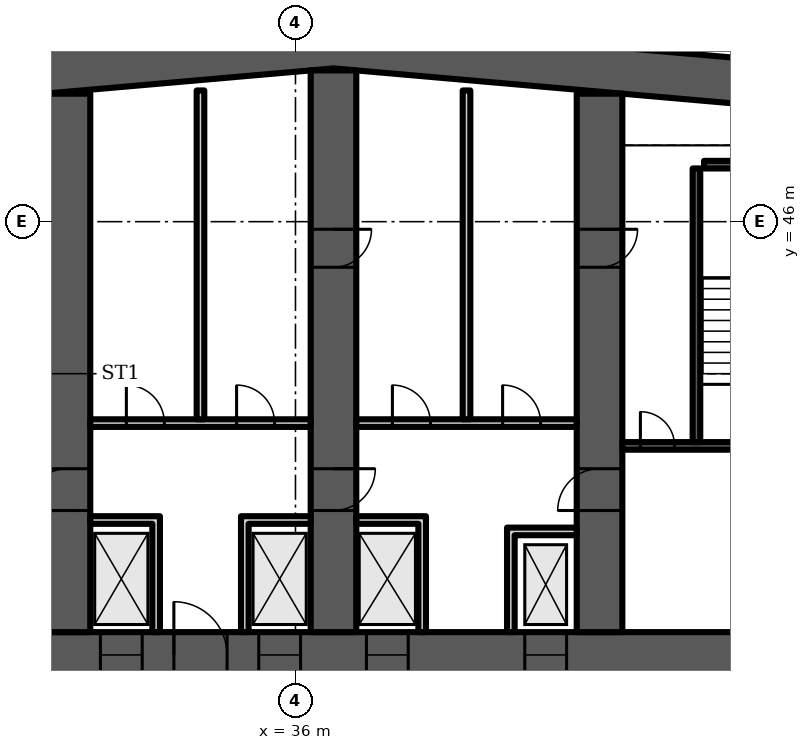
"""IFC4 building model, lengths in metres.
Left out: names, types, materials, properties, quantities, classifications, styles, units other than length and angle.
Written with IfcOpenShell. Run it as: python <this file> out.ifc"""

import sys

from ifc_helpers import new_model, si_unit, direction, frame, frame_2d, origin, place, context, subcontext, project, spatial, polyline, rectangle, outline, extrude, element, fill, save


model = new_model("IFC4")
c1 = context("Model", 3, precision=1e-05, world=origin(), true_north=direction((0.0, 1.0)))
c2 = subcontext(c1, "Body", "Model", "MODEL_VIEW")
j1 = project(units=[si_unit("LENGTHUNIT", "METRE"), si_unit("PLANEANGLEUNIT", "RADIAN")], contexts=[c1])
p1 = place(None, origin())
s1 = spatial("IfcSite", under=j1, at=p1, CompositionType="ELEMENT")
p2 = place(p1, origin())
s2 = spatial("IfcBuilding", under=s1, at=p2, CompositionType="ELEMENT")
p3 = place(p2, frame((0.0, 0.0, 81.1)))
s3 = spatial("IfcBuildingStorey", under=s2, at=p3, CompositionType="ELEMENT", Elevation=81.1)
p4 = place(p3, frame((0.0, 0.0, -0.0)))
e1 = element("IfcWall", 1, at=p4, inside=s3, PredefinedType="SHEAR", context=c2, shape_type="SweptSolid", body=[
    extrude(outline(polyline([(9.0, 47.583), (37.0, 50.032), (65.0, 47.583), (65.0, 48.787), (37.0, 51.237), (9.0, 48.787), (9.0, 47.583)])), origin(), (0.0, 0.0, 1.0), 3.6),
])
p5 = place(p3, frame((9.0, 34.6, 0.0), z_axis=(0.0, 0.0, 1.0), x_axis=(1.0, 0.0, 0.0)))
e2 = element("IfcWall", 2, at=p5, inside=s3, PredefinedType="SHEAR", context=c2, shape_type="SweptSolid", body=[
    extrude(rectangle(XDim=56.0, YDim=1.2, at=frame_2d((28.0, 0.0))), origin(), (0.0, 0.0, 1.0), 3.6),
])
p6 = place(p5, frame((2.0, 0.0, 0.0)))
e3 = element("IfcOpeningElement", 3, at=p6, cuts=e2, PredefinedType="OPENING", context=c2, shape_type="SweptSolid", body=[
    extrude(rectangle(XDim=1.0, YDim=2.1, at=frame_2d((0.5, 1.05))), frame((0.0, 0.61, 0.0), z_axis=(0.0, -1.0, 0.0), x_axis=(1.0, 0.0, 0.0)), (0.0, 0.0, 1.0), 1.22),
])
p7 = place(p5, frame((4.6, 0.0, 0.0)))
e4 = element("IfcOpeningElement", 4, at=p7, cuts=e2, PredefinedType="OPENING", context=c2, shape_type="SweptSolid", body=[
    extrude(rectangle(XDim=1.0, YDim=2.1, at=frame_2d((0.5, 1.05))), frame((0.0, 0.61, 0.0), z_axis=(0.0, -1.0, 0.0), x_axis=(1.0, 0.0, 0.0)), (0.0, 0.0, 1.0), 1.22),
])
p8 = place(p5, frame((7.867, 0.0, 0.0)))
e5 = element("IfcOpeningElement", 5, at=p8, cuts=e2, PredefinedType="OPENING", context=c2, shape_type="SweptSolid", body=[
    extrude(rectangle(XDim=1.1, YDim=2.1, at=frame_2d((0.55, 1.05))), frame((0.0, 0.61, 0.0), z_axis=(0.0, -1.0, 0.0), x_axis=(1.0, 0.0, 0.0)), (0.0, 0.0, 1.0), 1.22),
])
p9 = place(p5, frame((12.033, 0.0, 0.0)))
e6 = element("IfcOpeningElement", 6, at=p9, cuts=e2, PredefinedType="OPENING", context=c2, shape_type="SweptSolid", body=[
    extrude(rectangle(XDim=1.1, YDim=2.1, at=frame_2d((0.55, 1.05))), frame((0.0, 0.61, 0.0), z_axis=(0.0, -1.0, 0.0), x_axis=(1.0, 0.0, 0.0)), (0.0, 0.0, 1.0), 1.22),
])
p10 = place(p5, frame((9.8, 0.0, 0.0)))
e7 = element("IfcOpeningElement", 7, at=p10, cuts=e2, PredefinedType="OPENING", context=c2, shape_type="SweptSolid", body=[
    extrude(rectangle(XDim=1.4, YDim=2.1, at=frame_2d((0.7, 1.05))), frame((0.0, 0.61, 0.0), z_axis=(0.0, -1.0, 0.0), x_axis=(1.0, 0.0, 0.0)), (0.0, 0.0, 1.0), 1.22),
])
p11 = place(p5, frame((14.65, 0.0, 0.0)))
e8 = element("IfcOpeningElement", 8, at=p11, cuts=e2, PredefinedType="OPENING", context=c2, shape_type="SweptSolid", body=[
    extrude(rectangle(XDim=1.2, YDim=2.1, at=frame_2d((0.6, 1.05))), frame((0.0, 0.61, 0.0), z_axis=(0.0, -1.0, 0.0), x_axis=(1.0, 0.0, 0.0)), (0.0, 0.0, 1.0), 1.22),
])
p12 = place(p5, frame((21.867, 0.0, 0.0)))
e9 = element("IfcOpeningElement", 9, at=p12, cuts=e2, PredefinedType="OPENING", context=c2, shape_type="SweptSolid", body=[
    extrude(rectangle(XDim=1.1, YDim=2.1, at=frame_2d((0.55, 1.05))), frame((0.0, 0.61, 0.0), z_axis=(0.0, -1.0, 0.0), x_axis=(1.0, 0.0, 0.0)), (0.0, 0.0, 1.0), 1.22),
])
p13 = place(p5, frame((26.033, 0.0, 0.0)))
e10 = element("IfcOpeningElement", 10, at=p13, cuts=e2, PredefinedType="OPENING", context=c2, shape_type="SweptSolid", body=[
    extrude(rectangle(XDim=1.1, YDim=2.1, at=frame_2d((0.55, 1.05))), frame((0.0, 0.61, 0.0), z_axis=(0.0, -1.0, 0.0), x_axis=(1.0, 0.0, 0.0)), (0.0, 0.0, 1.0), 1.22),
])
p14 = place(p5, frame((23.8, 0.0, 0.0)))
e11 = element("IfcOpeningElement", 11, at=p14, cuts=e2, PredefinedType="OPENING", context=c2, shape_type="SweptSolid", body=[
    extrude(rectangle(XDim=1.4, YDim=2.1, at=frame_2d((0.7, 1.05))), frame((0.0, 0.61, 0.0), z_axis=(0.0, -1.0, 0.0), x_axis=(1.0, 0.0, 0.0)), (0.0, 0.0, 1.0), 1.22),
])
p15 = place(p5, frame((28.867, 0.0, 0.0)))
e12 = element("IfcOpeningElement", 12, at=p15, cuts=e2, PredefinedType="OPENING", context=c2, shape_type="SweptSolid", body=[
    extrude(rectangle(XDim=1.1, YDim=2.1, at=frame_2d((0.55, 1.05))), frame((0.0, 0.61, 0.0), z_axis=(0.0, -1.0, 0.0), x_axis=(1.0, 0.0, 0.0)), (0.0, 0.0, 1.0), 1.22),
])
p16 = place(p5, frame((33.033, 0.0, 0.0)))
e13 = element("IfcOpeningElement", 13, at=p16, cuts=e2, PredefinedType="OPENING", context=c2, shape_type="SweptSolid", body=[
    extrude(rectangle(XDim=1.1, YDim=2.1, at=frame_2d((0.55, 1.05))), frame((0.0, 0.61, 0.0), z_axis=(0.0, -1.0, 0.0), x_axis=(1.0, 0.0, 0.0)), (0.0, 0.0, 1.0), 1.22),
])
p17 = place(p5, frame((40.15, 0.0, 0.0)))
e14 = element("IfcOpeningElement", 14, at=p17, cuts=e2, PredefinedType="OPENING", context=c2, shape_type="SweptSolid", body=[
    extrude(rectangle(XDim=1.2, YDim=2.1, at=frame_2d((0.6, 1.05))), frame((0.0, 0.61, 0.0), z_axis=(0.0, -1.0, 0.0), x_axis=(1.0, 0.0, 0.0)), (0.0, 0.0, 1.0), 1.22),
])
p18 = place(p5, frame((44.8, 0.0, 0.0)))
e15 = element("IfcOpeningElement", 15, at=p18, cuts=e2, PredefinedType="OPENING", context=c2, shape_type="SweptSolid", body=[
    extrude(rectangle(XDim=1.4, YDim=2.1, at=frame_2d((0.7, 1.05))), frame((0.0, 0.61, 0.0), z_axis=(0.0, -1.0, 0.0), x_axis=(1.0, 0.0, 0.0)), (0.0, 0.0, 1.0), 1.22),
])
p19 = place(p5, frame((49.867, 0.0, 0.0)))
e16 = element("IfcOpeningElement", 16, at=p19, cuts=e2, PredefinedType="OPENING", context=c2, shape_type="SweptSolid", body=[
    extrude(rectangle(XDim=1.1, YDim=2.1, at=frame_2d((0.55, 1.05))), frame((0.0, 0.61, 0.0), z_axis=(0.0, -1.0, 0.0), x_axis=(1.0, 0.0, 0.0)), (0.0, 0.0, 1.0), 1.22),
])
p20 = place(p5, frame((53.5, 0.0, 0.0)))
e17 = element("IfcOpeningElement", 17, at=p20, cuts=e2, PredefinedType="OPENING", context=c2, shape_type="SweptSolid", body=[
    extrude(rectangle(XDim=1.1, YDim=2.1, at=frame_2d((0.55, 1.05))), frame((0.0, 0.61, 0.0), z_axis=(0.0, -1.0, 0.0), x_axis=(1.0, 0.0, 0.0)), (0.0, 0.0, 1.0), 1.22),
])
p21 = place(p5, frame((51.567, 0.0, 0.0)))
e18 = element("IfcOpeningElement", 18, at=p21, cuts=e2, PredefinedType="OPENING", context=c2, shape_type="SweptSolid", body=[
    extrude(rectangle(XDim=1.4, YDim=2.1, at=frame_2d((0.7, 1.05))), frame((0.0, 0.61, 0.0), z_axis=(0.0, -1.0, 0.0), x_axis=(1.0, 0.0, 0.0)), (0.0, 0.0, 1.0), 1.22),
])
p22 = place(p3, frame((30.0, 35.2, 0.0), z_axis=(0.0, 0.0, 1.0), x_axis=(0.0, 1.0, 0.0)))
e19 = element("IfcWall", 19, at=p22, inside=s3, PredefinedType="SHEAR", context=c2, shape_type="SweptSolid", body=[
    extrude(rectangle(XDim=14.168, YDim=1.2, at=frame_2d((7.084, 0.0))), origin(), (0.0, 0.0, 1.0), 3.6),
])
p23 = place(p22, frame((3.2, 0.0, 0.0)))
e20 = element("IfcOpeningElement", 20, at=p23, cuts=e19, PredefinedType="OPENING", context=c2, shape_type="SweptSolid", body=[
    extrude(rectangle(XDim=1.1, YDim=2.1, at=frame_2d((0.55, 1.05))), frame((0.0, 0.61, 0.0), z_axis=(0.0, -1.0, 0.0), x_axis=(1.0, 0.0, 0.0)), (0.0, 0.0, 1.0), 1.22),
])
p24 = place(p3, frame((37.0, 35.2, 0.0), z_axis=(0.0, 0.0, 1.0), x_axis=(0.0, 1.0, 0.0)))
e21 = element("IfcWall", 21, at=p24, inside=s3, PredefinedType="SHEAR", context=c2, shape_type="SweptSolid", body=[
    extrude(rectangle(XDim=14.78, YDim=1.2, at=frame_2d((7.39, 0.0))), origin(), (0.0, 0.0, 1.0), 3.6),
])
p25 = place(p24, frame((3.2, 0.0, 0.0)))
e22 = element("IfcOpeningElement", 22, at=p25, cuts=e21, PredefinedType="OPENING", context=c2, shape_type="SweptSolid", body=[
    extrude(rectangle(XDim=1.1, YDim=2.1, at=frame_2d((0.55, 1.05))), frame((0.0, 0.61, 0.0), z_axis=(0.0, -1.0, 0.0), x_axis=(1.0, 0.0, 0.0)), (0.0, 0.0, 1.0), 1.22),
])
p26 = place(p24, frame((9.6, 0.0, 0.0)))
e23 = element("IfcOpeningElement", 23, at=p26, cuts=e21, PredefinedType="OPENING", context=c2, shape_type="SweptSolid", body=[
    extrude(rectangle(XDim=1.0, YDim=2.1, at=frame_2d((0.5, 1.05))), frame((0.0, 0.61, 0.0), z_axis=(0.0, -1.0, 0.0), x_axis=(1.0, 0.0, 0.0)), (0.0, 0.0, 1.0), 1.22),
])
p27 = place(p3, frame((44.0, 35.2, 0.0), z_axis=(0.0, 0.0, 1.0), x_axis=(0.0, 1.0, 0.0)))
e24 = element("IfcWall", 24, at=p27, inside=s3, PredefinedType="SHEAR", context=c2, shape_type="SweptSolid", body=[
    extrude(rectangle(XDim=14.168, YDim=1.2, at=frame_2d((7.084, 0.0))), origin(), (0.0, 0.0, 1.0), 3.6),
])
p28 = place(p27, frame((3.2, 0.0, 0.0)))
e25 = element("IfcOpeningElement", 25, at=p28, cuts=e24, PredefinedType="OPENING", context=c2, shape_type="SweptSolid", body=[
    extrude(rectangle(XDim=1.1, YDim=2.1, at=frame_2d((0.55, 1.05))), frame((0.0, 0.61, 0.0), z_axis=(0.0, -1.0, 0.0), x_axis=(1.0, 0.0, 0.0)), (0.0, 0.0, 1.0), 1.22),
])
p29 = place(p27, frame((9.6, 0.0, 0.0)))
e26 = element("IfcOpeningElement", 26, at=p29, cuts=e24, PredefinedType="OPENING", context=c2, shape_type="SweptSolid", body=[
    extrude(rectangle(XDim=1.0, YDim=2.1, at=frame_2d((0.5, 1.05))), frame((0.0, 0.61, 0.0), z_axis=(0.0, -1.0, 0.0), x_axis=(1.0, 0.0, 0.0)), (0.0, 0.0, 1.0), 1.22),
])
p30 = place(p3, frame((30.6, 40.7, 0.0), z_axis=(0.0, 0.0, 1.0), x_axis=(1.0, 0.0, 0.0)))
e27 = element("IfcWall", 27, at=p30, inside=s3, PredefinedType="PARTITIONING", context=c2, shape_type="SweptSolid", body=[
    extrude(rectangle(XDim=5.8, YDim=0.2, at=frame_2d((2.9, 0.0))), origin(), (0.0, 0.0, 1.0), 3.2),
])
p31 = place(p30, frame((0.95, 0.0, 0.0)))
e28 = element("IfcOpeningElement", 28, at=p31, cuts=e27, PredefinedType="OPENING", context=c2, shape_type="SweptSolid", body=[
    extrude(rectangle(XDim=1.0, YDim=2.1, at=frame_2d((0.5, 1.05))), frame((0.0, 0.11, 0.0), z_axis=(0.0, -1.0, 0.0), x_axis=(1.0, 0.0, 0.0)), (0.0, 0.0, 1.0), 0.22),
])
p32 = place(p30, frame((3.85, 0.0, 0.0)))
e29 = element("IfcOpeningElement", 29, at=p32, cuts=e27, PredefinedType="OPENING", context=c2, shape_type="SweptSolid", body=[
    extrude(rectangle(XDim=1.0, YDim=2.1, at=frame_2d((0.5, 1.05))), frame((0.0, 0.11, 0.0), z_axis=(0.0, -1.0, 0.0), x_axis=(1.0, 0.0, 0.0)), (0.0, 0.0, 1.0), 0.22),
])
p33 = place(p3, frame((0.0, 0.0, -0.0)))
e30 = element("IfcWall", 30, at=p33, inside=s3, PredefinedType="PARTITIONING", context=c2, shape_type="SweptSolid", body=[
    extrude(outline(polyline([(32.233, 38.05), (30.6, 38.05), (30.6, 38.25), (32.233, 38.25), (32.433, 38.25), (32.433, 35.2), (32.233, 35.2), (32.233, 38.05)])), origin(), (0.0, 0.0, 1.0), 3.2),
])
p34 = place(p3, frame((0.0, 0.0, -0.0)))
e31 = element("IfcWall", 31, at=p34, inside=s3, PredefinedType="PARTITIONING", context=c2, shape_type="SweptSolid", body=[
    extrude(outline(polyline([(34.567, 38.25), (34.767, 38.25), (36.4, 38.25), (36.4, 38.05), (34.767, 38.05), (34.767, 35.2), (34.567, 35.2), (34.567, 38.25)])), origin(), (0.0, 0.0, 1.0), 3.2),
])
p35 = place(p3, frame((33.5, 40.8, 0.0), z_axis=(0.0, 0.0, 1.0), x_axis=(0.0, 1.0, 0.0)))
e32 = element("IfcWall", 32, at=p35, inside=s3, PredefinedType="PARTITIONING", context=c2, shape_type="SweptSolid", body=[
    extrude(rectangle(XDim=8.653, YDim=0.2, at=frame_2d((4.326, 0.0))), origin(), (0.0, 0.0, 1.0), 3.2),
])
p36 = place(p3, frame((37.6, 40.7, 0.0), z_axis=(0.0, 0.0, 1.0), x_axis=(1.0, 0.0, 0.0)))
e33 = element("IfcWall", 33, at=p36, inside=s3, PredefinedType="PARTITIONING", context=c2, shape_type="SweptSolid", body=[
    extrude(rectangle(XDim=5.8, YDim=0.2, at=frame_2d((2.9, 0.0))), origin(), (0.0, 0.0, 1.0), 3.2),
])
p37 = place(p36, frame((0.95, 0.0, 0.0)))
e34 = element("IfcOpeningElement", 34, at=p37, cuts=e33, PredefinedType="OPENING", context=c2, shape_type="SweptSolid", body=[
    extrude(rectangle(XDim=1.0, YDim=2.1, at=frame_2d((0.5, 1.05))), frame((0.0, 0.11, 0.0), z_axis=(0.0, -1.0, 0.0), x_axis=(1.0, 0.0, 0.0)), (0.0, 0.0, 1.0), 0.22),
])
p38 = place(p36, frame((3.85, 0.0, 0.0)))
e35 = element("IfcOpeningElement", 35, at=p38, cuts=e33, PredefinedType="OPENING", context=c2, shape_type="SweptSolid", body=[
    extrude(rectangle(XDim=1.0, YDim=2.1, at=frame_2d((0.5, 1.05))), frame((0.0, 0.11, 0.0), z_axis=(0.0, -1.0, 0.0), x_axis=(1.0, 0.0, 0.0)), (0.0, 0.0, 1.0), 0.22),
])
p39 = place(p3, frame((0.0, 0.0, -0.0)))
e36 = element("IfcWall", 36, at=p39, inside=s3, PredefinedType="PARTITIONING", context=c2, shape_type="SweptSolid", body=[
    extrude(outline(polyline([(41.567, 37.95), (41.767, 37.95), (43.4, 37.95), (43.4, 37.75), (41.767, 37.75), (41.767, 35.2), (41.567, 35.2), (41.567, 37.95)])), origin(), (0.0, 0.0, 1.0), 3.2),
])
p40 = place(p3, frame((0.0, 0.0, -0.0)))
e37 = element("IfcWall", 37, at=p40, inside=s3, PredefinedType="PARTITIONING", context=c2, shape_type="SweptSolid", body=[
    extrude(outline(polyline([(39.233, 38.05), (37.6, 38.05), (37.6, 38.25), (39.233, 38.25), (39.433, 38.25), (39.433, 35.2), (39.233, 35.2), (39.233, 38.05)])), origin(), (0.0, 0.0, 1.0), 3.2),
])
p41 = place(p3, frame((40.5, 40.8, 0.0), z_axis=(0.0, 0.0, 1.0), x_axis=(0.0, 1.0, 0.0)))
e38 = element("IfcWall", 38, at=p41, inside=s3, PredefinedType="PARTITIONING", context=c2, shape_type="SweptSolid", body=[
    extrude(rectangle(XDim=8.653, YDim=0.2, at=frame_2d((4.326, 0.0))), origin(), (0.0, 0.0, 1.0), 3.2),
])
p42 = place(p3, frame((44.6, 40.1, 0.0), z_axis=(0.0, 0.0, 1.0), x_axis=(1.0, 0.0, 0.0)))
e39 = element("IfcWall", 39, at=p42, inside=s3, PredefinedType="SHEAR", context=c2, shape_type="SweptSolid", body=[
    extrude(rectangle(XDim=5.8, YDim=0.2, at=frame_2d((2.9, 0.0))), origin(), (0.0, 0.0, 1.0), 3.2),
])
p43 = place(p42, frame((3.325, 0.0, 0.0)))
e40 = element("IfcOpeningElement", 40, at=p43, cuts=e39, PredefinedType="OPENING", context=c2, shape_type="SweptSolid", body=[
    extrude(rectangle(XDim=1.2, YDim=2.1, at=frame_2d((0.6, 1.05))), frame((0.0, 0.11, 0.0), z_axis=(0.0, -1.0, 0.0), x_axis=(1.0, 0.0, 0.0)), (0.0, 0.0, 1.0), 0.22),
])
p44 = place(p42, frame((0.475, 0.0, 0.0)))
e41 = element("IfcOpeningElement", 41, at=p44, cuts=e39, PredefinedType="OPENING", context=c2, shape_type="SweptSolid", body=[
    extrude(rectangle(XDim=0.9, YDim=2.1, at=frame_2d((0.45, 1.05))), frame((0.0, 0.11, 0.0), z_axis=(0.0, -1.0, 0.0), x_axis=(1.0, 0.0, 0.0)), (0.0, 0.0, 1.0), 0.22),
])
p45 = place(p3, frame((46.55, 40.2, 0.0), z_axis=(0.0, 0.0, 1.0), x_axis=(0.0, 1.0, 0.0)))
e42 = element("IfcWall", 42, at=p45, inside=s3, PredefinedType="SHEAR", context=c2, shape_type="SweptSolid", body=[
    extrude(rectangle(XDim=7.2, YDim=0.2, at=frame_2d((3.6, 0.0))), origin(), (0.0, 0.0, 1.0), 3.2),
])
p46 = place(p3, frame((46.75, 47.5, 0.0), z_axis=(0.0, 0.0, 1.0), x_axis=(1.0, 0.0, 0.0)))
e43 = element("IfcWall", 43, at=p46, inside=s3, PredefinedType="SHEAR", context=c2, shape_type="SweptSolid", body=[
    extrude(rectangle(XDim=3.65, YDim=0.2, at=frame_2d((1.825, 0.0))), origin(), (0.0, 0.0, 1.0), 3.2),
])
p47 = place(p12, origin())
e44 = element("IfcDoor", 44, at=p47, inside=s3, OperationType="DOUBLE_DOOR_SLIDING", PredefinedType="DOOR", context=c2, shape_type="SweptSolid", body=[
    extrude(rectangle(XDim=1.1, YDim=2.1, at=frame_2d((0.55, 1.05))), frame((0.0, 0.025, 0.0), z_axis=(0.0, -1.0, 0.0), x_axis=(1.0, 0.0, 0.0)), (0.0, 0.0, 1.0), 0.05),
])
fill(e9, e44)
p48 = place(p13, origin())
e45 = element("IfcDoor", 45, at=p48, inside=s3, OperationType="DOUBLE_DOOR_SLIDING", PredefinedType="DOOR", context=c2, shape_type="SweptSolid", body=[
    extrude(rectangle(XDim=1.1, YDim=2.1, at=frame_2d((0.55, 1.05))), frame((0.0, 0.025, 0.0), z_axis=(0.0, -1.0, 0.0), x_axis=(1.0, 0.0, 0.0)), (0.0, 0.0, 1.0), 0.05),
])
fill(e10, e45)
p49 = place(p14, origin())
e46 = element("IfcDoor", 46, at=p49, inside=s3, OperationType="DOUBLE_DOOR_SINGLE_SWING", PredefinedType="DOOR", context=c2, shape_type="SweptSolid", body=[
    extrude(rectangle(XDim=1.4, YDim=2.1, at=frame_2d((0.7, 1.05))), frame((0.0, 0.025, 0.0), z_axis=(0.0, -1.0, 0.0), x_axis=(1.0, 0.0, 0.0)), (0.0, 0.0, 1.0), 0.05),
])
fill(e11, e46)
p50 = place(p31, origin())
e47 = element("IfcDoor", 47, at=p50, inside=s3, OperationType="SINGLE_SWING_LEFT", PredefinedType="DOOR", context=c2, shape_type="SweptSolid", body=[
    extrude(rectangle(XDim=1.0, YDim=2.1, at=frame_2d((0.5, 1.05))), frame((0.0, 0.025, 0.0), z_axis=(0.0, -1.0, 0.0), x_axis=(1.0, 0.0, 0.0)), (0.0, 0.0, 1.0), 0.05),
])
fill(e28, e47)
p51 = place(p32, origin())
e48 = element("IfcDoor", 48, at=p51, inside=s3, OperationType="SINGLE_SWING_LEFT", PredefinedType="DOOR", context=c2, shape_type="SweptSolid", body=[
    extrude(rectangle(XDim=1.0, YDim=2.1, at=frame_2d((0.5, 1.05))), frame((0.0, 0.025, 0.0), z_axis=(0.0, -1.0, 0.0), x_axis=(1.0, 0.0, 0.0)), (0.0, 0.0, 1.0), 0.05),
])
fill(e29, e48)
p52 = place(p15, origin())
e49 = element("IfcDoor", 49, at=p52, inside=s3, OperationType="DOUBLE_DOOR_SLIDING", PredefinedType="DOOR", context=c2, shape_type="SweptSolid", body=[
    extrude(rectangle(XDim=1.1, YDim=2.1, at=frame_2d((0.55, 1.05))), frame((0.0, 0.025, 0.0), z_axis=(0.0, -1.0, 0.0), x_axis=(1.0, 0.0, 0.0)), (0.0, 0.0, 1.0), 0.05),
])
fill(e12, e49)
p53 = place(p16, origin())
e50 = element("IfcDoor", 50, at=p53, inside=s3, OperationType="DOUBLE_DOOR_SLIDING", PredefinedType="DOOR", context=c2, shape_type="SweptSolid", body=[
    extrude(rectangle(XDim=1.1, YDim=2.1, at=frame_2d((0.55, 1.05))), frame((0.0, 0.025, 0.0), z_axis=(0.0, -1.0, 0.0), x_axis=(1.0, 0.0, 0.0)), (0.0, 0.0, 1.0), 0.05),
])
fill(e13, e50)
p54 = place(p37, origin())
e51 = element("IfcDoor", 51, at=p54, inside=s3, OperationType="SINGLE_SWING_LEFT", PredefinedType="DOOR", context=c2, shape_type="SweptSolid", body=[
    extrude(rectangle(XDim=1.0, YDim=2.1, at=frame_2d((0.5, 1.05))), frame((0.0, 0.025, 0.0), z_axis=(0.0, -1.0, 0.0), x_axis=(1.0, 0.0, 0.0)), (0.0, 0.0, 1.0), 0.05),
])
fill(e34, e51)
p55 = place(p38, origin())
e52 = element("IfcDoor", 52, at=p55, inside=s3, OperationType="SINGLE_SWING_LEFT", PredefinedType="DOOR", context=c2, shape_type="SweptSolid", body=[
    extrude(rectangle(XDim=1.0, YDim=2.1, at=frame_2d((0.5, 1.05))), frame((0.0, 0.025, 0.0), z_axis=(0.0, -1.0, 0.0), x_axis=(1.0, 0.0, 0.0)), (0.0, 0.0, 1.0), 0.05),
])
fill(e35, e52)
p56 = place(p44, origin())
e53 = element("IfcDoor", 53, at=p56, inside=s3, OperationType="SINGLE_SWING_LEFT", PredefinedType="DOOR", context=c2, shape_type="SweptSolid", body=[
    extrude(rectangle(XDim=0.9, YDim=2.1, at=frame_2d((0.45, 1.05))), frame((0.0, 0.025, 0.0), z_axis=(0.0, -1.0, 0.0), x_axis=(1.0, 0.0, 0.0)), (0.0, 0.0, 1.0), 0.05),
])
fill(e41, e53)
p57 = place(p23, origin())
e54 = element("IfcDoor", 54, at=p57, inside=s3, OperationType="SINGLE_SWING_LEFT", PredefinedType="DOOR", context=c2, shape_type="SweptSolid", body=[
    extrude(rectangle(XDim=1.1, YDim=2.1, at=frame_2d((0.55, 1.05))), frame((0.0, 0.025, 0.0), z_axis=(0.0, -1.0, 0.0), x_axis=(1.0, 0.0, 0.0)), (0.0, 0.0, 1.0), 0.05),
])
fill(e20, e54)
p58 = place(p25, origin())
e55 = element("IfcDoor", 55, at=p58, inside=s3, OperationType="SINGLE_SWING_RIGHT", PredefinedType="DOOR", context=c2, shape_type="SweptSolid", body=[
    extrude(rectangle(XDim=1.1, YDim=2.1, at=frame_2d((0.55, 1.05))), frame((0.0, 0.025, 0.0), z_axis=(0.0, -1.0, 0.0), x_axis=(1.0, 0.0, 0.0)), (0.0, 0.0, 1.0), 0.05),
])
fill(e22, e55)
p59 = place(p26, origin())
e56 = element("IfcDoor", 56, at=p59, inside=s3, OperationType="SINGLE_SWING_RIGHT", PredefinedType="DOOR", context=c2, shape_type="SweptSolid", body=[
    extrude(rectangle(XDim=1.0, YDim=2.1, at=frame_2d((0.5, 1.05))), frame((0.0, 0.6, 0.0), z_axis=(0.0, -1.0, 0.0), x_axis=(1.0, 0.0, 0.0)), (0.0, 0.0, 1.0), 1.199),
])
fill(e23, e56)
p60 = place(p28, origin())
e57 = element("IfcDoor", 57, at=p60, inside=s3, OperationType="SINGLE_SWING_LEFT", PredefinedType="DOOR", context=c2, shape_type="SweptSolid", body=[
    extrude(rectangle(XDim=1.1, YDim=2.1, at=frame_2d((0.55, 1.05))), frame((0.0, 0.025, 0.0), z_axis=(0.0, -1.0, 0.0), x_axis=(1.0, 0.0, 0.0)), (0.0, 0.0, 1.0), 0.05),
])
fill(e25, e57)
p61 = place(p29, origin())
e58 = element("IfcDoor", 58, at=p61, inside=s3, OperationType="SINGLE_SWING_RIGHT", PredefinedType="DOOR", context=c2, shape_type="SweptSolid", body=[
    extrude(rectangle(XDim=1.0, YDim=2.1, at=frame_2d((0.5, 1.05))), frame((0.0, 0.6, 0.0), z_axis=(0.0, -1.0, 0.0), x_axis=(1.0, 0.0, 0.0)), (0.0, 0.0, 1.0), 1.199),
])
fill(e26, e58)
save(model, sys.argv[1])
